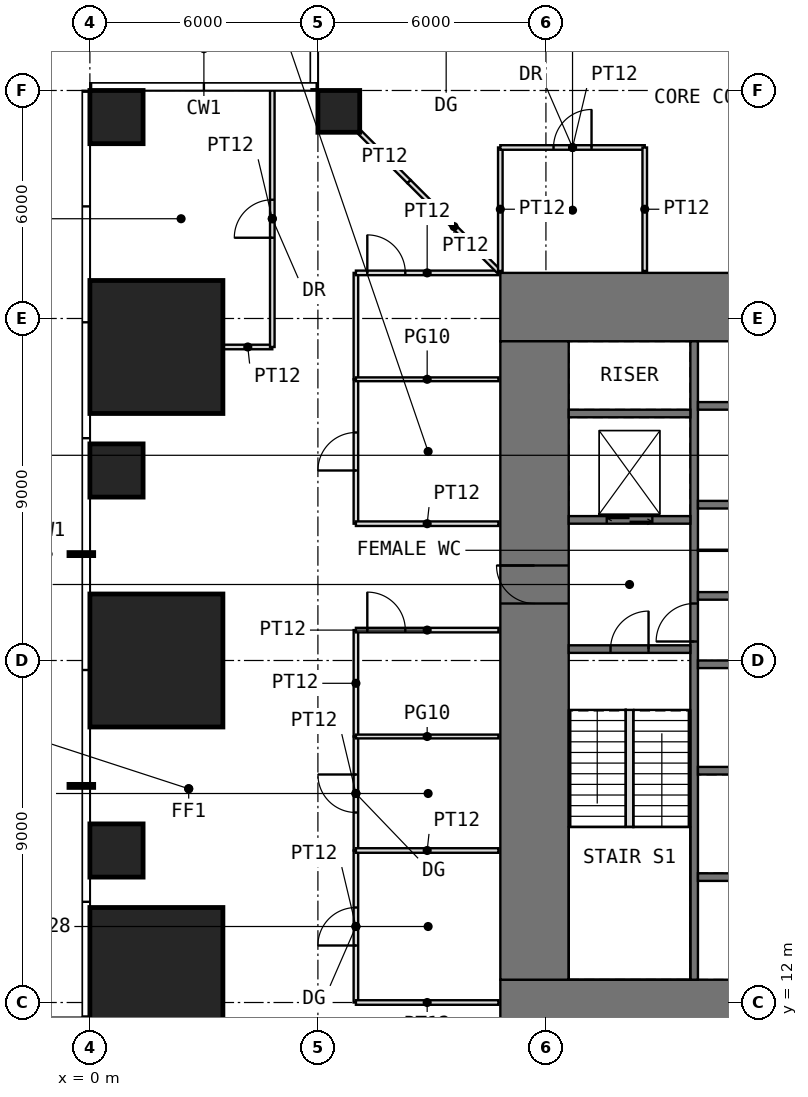
"""IFC4 building model, lengths in metres.
Left out: names, types, materials, properties, quantities, classifications, styles, units other than length and angle.
Written with IfcOpenShell. Run it as: python <this file> out.ifc"""

import sys

from ifc_helpers import new_model, si_unit, direction, frame, frame_2d, origin, origin_2d, place, context, subcontext, project, spatial, rectangle, extrude, element, fill, save


model = new_model("IFC4")
c1 = context("Model", 3, precision=1e-05, world=origin(), true_north=direction((0.0, 1.0)))
c2 = subcontext(c1, "Body", "Model", "MODEL_VIEW")
j1 = project(units=[si_unit("LENGTHUNIT", "METRE"), si_unit("PLANEANGLEUNIT", "RADIAN")], contexts=[c1])
p1 = place(None, origin())
s1 = spatial("IfcSite", under=j1, at=p1, CompositionType="ELEMENT")
p2 = place(p1, origin())
s2 = spatial("IfcBuilding", under=s1, at=p2, CompositionType="ELEMENT")
p3 = place(p2, frame((0.0, 0.0, 70.5)))
s3 = spatial("IfcBuildingStorey", under=s2, at=p3, CompositionType="ELEMENT", Elevation=70.5)
p4 = place(p3, frame((1.75, 12.75, 0.0), z_axis=(0.0, 0.0, 1.0), x_axis=(1.0, 0.0, 0.0)))
e1 = element("IfcColumn", 1, at=p4, inside=s3, PredefinedType="COLUMN", context=c2, shape_type="SweptSolid", body=[
    extrude(rectangle(XDim=3.5, YDim=3.5, at=origin_2d()), origin(), (0.0, 0.0, 1.0), 4.0),
])
p5 = place(p3, frame((0.7, 16.0, 0.0), z_axis=(0.0, 0.0, 1.0), x_axis=(1.0, 0.0, 0.0)))
e2 = element("IfcColumn", 2, at=p5, inside=s3, PredefinedType="COLUMN", context=c2, shape_type="SweptSolid", body=[
    extrude(rectangle(XDim=1.4, YDim=1.4, at=origin_2d()), origin(), (0.0, 0.0, 1.0), 4.0),
])
p6 = place(p3, frame((1.75, 21.0, 0.0), z_axis=(0.0, 0.0, 1.0), x_axis=(1.0, 0.0, 0.0)))
e3 = element("IfcColumn", 3, at=p6, inside=s3, PredefinedType="COLUMN", context=c2, shape_type="SweptSolid", body=[
    extrude(rectangle(XDim=3.5, YDim=3.5, at=origin_2d()), origin(), (0.0, 0.0, 1.0), 4.0),
])
p7 = place(p3, frame((0.7, 26.0, 0.0), z_axis=(0.0, 0.0, 1.0), x_axis=(1.0, 0.0, 0.0)))
e4 = element("IfcColumn", 4, at=p7, inside=s3, PredefinedType="COLUMN", context=c2, shape_type="SweptSolid", body=[
    extrude(rectangle(XDim=1.4, YDim=1.4, at=origin_2d()), origin(), (0.0, 0.0, 1.0), 4.0),
])
p8 = place(p3, frame((1.75, 29.25, 0.0), z_axis=(0.0, 0.0, 1.0), x_axis=(1.0, 0.0, 0.0)))
e5 = element("IfcColumn", 5, at=p8, inside=s3, PredefinedType="COLUMN", context=c2, shape_type="SweptSolid", body=[
    extrude(rectangle(XDim=3.5, YDim=3.5, at=origin_2d()), origin(), (0.0, 0.0, 1.0), 4.0),
])
p9 = place(p3, frame((0.7, 35.3, 0.0), z_axis=(0.0, 0.0, 1.0), x_axis=(1.0, 0.0, 0.0)))
e6 = element("IfcColumn", 6, at=p9, inside=s3, PredefinedType="COLUMN", context=c2, shape_type="SweptSolid", body=[
    extrude(rectangle(XDim=1.4, YDim=1.4, at=origin_2d()), origin(), (0.0, 0.0, 1.0), 4.0),
])
p10 = place(p3, frame((6.55, 35.45, 0.0), z_axis=(0.0, 0.0, 1.0), x_axis=(1.0, 0.0, 0.0)))
e7 = element("IfcColumn", 7, at=p10, inside=s3, PredefinedType="COLUMN", context=c2, shape_type="SweptSolid", body=[
    extrude(rectangle(XDim=1.1, YDim=1.1, at=origin_2d()), origin(), (0.0, 0.0, 1.0), 4.0),
])
p11 = place(p3, frame((10.8, 11.7, -0.05), z_axis=(0.0, 0.0, 1.0), x_axis=(1.0, 0.0, 0.0)))
e8 = element("IfcWall", 8, at=p11, inside=s3, PredefinedType="SHEAR", context=c2, shape_type="SweptSolid", body=[
    extrude(rectangle(XDim=20.4, YDim=1.8, at=frame_2d((10.2, 0.0))), origin(), (0.0, 0.0, 1.0), 4.0),
])
p12 = place(p11, frame((9.2, 0.0, 0.05)))
e9 = element("IfcOpeningElement", 9, at=p12, cuts=e8, PredefinedType="OPENING", context=c2, shape_type="SweptSolid", body=[
    extrude(rectangle(XDim=2.0, YDim=2.2, at=frame_2d((1.0, 1.1))), frame((0.0, 0.91, 0.0), z_axis=(0.0, -1.0, 0.0), x_axis=(1.0, 0.0, 0.0)), (0.0, 0.0, 1.0), 1.82),
])
p13 = place(p3, frame((10.8, 30.3, -0.05), z_axis=(0.0, 0.0, 1.0), x_axis=(1.0, 0.0, 0.0)))
e10 = element("IfcWall", 10, at=p13, inside=s3, PredefinedType="SHEAR", context=c2, shape_type="SweptSolid", body=[
    extrude(rectangle(XDim=20.4, YDim=1.8, at=frame_2d((10.2, 0.0))), origin(), (0.0, 0.0, 1.0), 4.0),
])
p14 = place(p13, frame((9.2, 0.0, 0.05)))
e11 = element("IfcOpeningElement", 11, at=p14, cuts=e10, PredefinedType="OPENING", context=c2, shape_type="SweptSolid", body=[
    extrude(rectangle(XDim=2.0, YDim=2.2, at=frame_2d((1.0, 1.1))), frame((0.0, 0.91, 0.0), z_axis=(0.0, -1.0, 0.0), x_axis=(1.0, 0.0, 0.0)), (0.0, 0.0, 1.0), 1.82),
])
p15 = place(p3, frame((11.7, 12.6, -0.05), z_axis=(0.0, 0.0, 1.0), x_axis=(0.0, 1.0, 0.0)))
e12 = element("IfcWall", 12, at=p15, inside=s3, PredefinedType="SHEAR", context=c2, shape_type="SweptSolid", body=[
    extrude(rectangle(XDim=16.8, YDim=1.8, at=frame_2d((8.4, 0.0))), origin(), (0.0, 0.0, 1.0), 4.0),
])
p16 = place(p15, frame((9.9, 0.0, 0.05)))
e13 = element("IfcOpeningElement", 13, at=p16, cuts=e12, PredefinedType="OPENING", context=c2, shape_type="SweptSolid", body=[
    extrude(rectangle(XDim=1.0, YDim=2.2, at=frame_2d((0.5, 1.1))), frame((0.0, 0.91, 0.0), z_axis=(0.0, -1.0, 0.0), x_axis=(1.0, 0.0, 0.0)), (0.0, 0.0, 1.0), 1.82),
])
p17 = place(p3, frame((15.9, 12.6, -0.05), z_axis=(0.0, 0.0, 1.0), x_axis=(0.0, 1.0, 0.0)))
e14 = element("IfcWall", 14, at=p17, inside=s3, PredefinedType="SHEAR", context=c2, shape_type="SweptSolid", body=[
    extrude(rectangle(XDim=16.8, YDim=0.2, at=frame_2d((8.4, 0.0))), origin(), (0.0, 0.0, 1.0), 4.0),
])
p18 = place(p17, frame((8.9, 0.0, 0.05)))
e15 = element("IfcOpeningElement", 15, at=p18, cuts=e14, PredefinedType="OPENING", context=c2, shape_type="SweptSolid", body=[
    extrude(rectangle(XDim=1.0, YDim=2.2, at=frame_2d((0.5, 1.1))), frame((0.0, 0.11, 0.0), z_axis=(0.0, -1.0, 0.0), x_axis=(1.0, 0.0, 0.0)), (0.0, 0.0, 1.0), 0.22),
])
p19 = place(p3, frame((12.6, 21.3, -0.05), z_axis=(0.0, 0.0, 1.0), x_axis=(1.0, 0.0, 0.0)))
e16 = element("IfcWall", 16, at=p19, inside=s3, PredefinedType="SHEAR", context=c2, shape_type="SweptSolid", body=[
    extrude(rectangle(XDim=3.2, YDim=0.2, at=frame_2d((1.6, 0.0))), origin(), (0.0, 0.0, 1.0), 4.0),
])
p20 = place(p19, frame((1.1, 0.0, 0.05)))
e17 = element("IfcOpeningElement", 17, at=p20, cuts=e16, PredefinedType="OPENING", context=c2, shape_type="SweptSolid", body=[
    extrude(rectangle(XDim=1.0, YDim=2.2, at=frame_2d((0.5, 1.1))), frame((0.0, 0.11, 0.0), z_axis=(0.0, -1.0, 0.0), x_axis=(1.0, 0.0, 0.0)), (0.0, 0.0, 1.0), 0.22),
])
p21 = place(p3, frame((12.6, 24.7, -0.05), z_axis=(0.0, 0.0, 1.0), x_axis=(1.0, 0.0, 0.0)))
e18 = element("IfcWall", 18, at=p21, inside=s3, PredefinedType="SHEAR", context=c2, shape_type="SweptSolid", body=[
    extrude(rectangle(XDim=3.2, YDim=0.2, at=frame_2d((1.6, 0.0))), origin(), (0.0, 0.0, 1.0), 4.0),
])
p22 = place(p21, frame((1.0, 0.0, 0.05)))
e19 = element("IfcOpeningElement", 19, at=p22, cuts=e18, PredefinedType="OPENING", context=c2, shape_type="SweptSolid", body=[
    extrude(rectangle(XDim=1.2, YDim=2.2, at=frame_2d((0.6, 1.1))), frame((0.0, 0.11, 0.0), z_axis=(0.0, -1.0, 0.0), x_axis=(1.0, 0.0, 0.0)), (0.0, 0.0, 1.0), 0.22),
])
for number, where, z_axis, x_axis in (
    (20, (12.6, 27.5, -0.05), (0.0, 0.0, 1.0), (1.0, 0.0, 0.0)),
    (21, (16.0, 15.3, -0.05), (0.0, 0.0, 1.0), (1.0, 0.0, 0.0)),
    (22, (16.0, 18.1, -0.05), (0.0, 0.0, 1.0), (1.0, 0.0, 0.0)),
    (23, (16.0, 20.9, -0.05), (0.0, 0.0, 1.0), (1.0, 0.0, 0.0)),
    (24, (16.0, 22.7, -0.05), (0.0, 0.0, 1.0), (1.0, 0.0, 0.0)),
    (25, (16.0, 25.1, -0.05), (0.0, 0.0, 1.0), (1.0, 0.0, 0.0)),
    (26, (16.0, 27.7, -0.05), (0.0, 0.0, 1.0), (1.0, 0.0, 0.0)),
):
    element("IfcWall", number, at=place(p3, frame(where, z_axis=z_axis, x_axis=x_axis)), inside=s3, PredefinedType="SHEAR", context=c2, shape_type="SweptSolid", body=[
        extrude(rectangle(XDim=3.2, YDim=0.2, at=frame_2d((1.6, 0.0))), origin(), (0.0, 0.0, 1.0), 4.0),
    ])
p23 = place(p3, frame((16.0, 23.9, 0.0), z_axis=(0.0, 0.0, 1.0), x_axis=(1.0, 0.0, 0.0)))
e27 = element("IfcWall", 27, at=p23, inside=s3, PredefinedType="PARTITIONING", context=c2, shape_type="SweptSolid", body=[
    extrude(rectangle(XDim=1.4, YDim=0.03, at=frame_2d((0.7, 0.0))), origin(), (0.0, 0.0, 1.0), 3.75),
])
p24 = place(p3, frame((3.51, 29.25, 0.0), z_axis=(0.0, 0.0, 1.0), x_axis=(1.0, 0.0, 0.0)))
e28 = element("IfcWall", 28, at=p24, inside=s3, PredefinedType="PARTITIONING", context=c2, shape_type="SweptSolid", body=[
    extrude(rectangle(XDim=1.29, YDim=0.12, at=frame_2d((0.645, 0.0))), origin(), (0.0, 0.0, 1.0), 3.75),
])
p25 = place(p3, frame((4.8, 29.25, 0.0), z_axis=(0.0, 0.0, 1.0), x_axis=(0.0, 1.0, 0.0)))
e29 = element("IfcWall", 29, at=p25, inside=s3, PredefinedType="PARTITIONING", context=c2, shape_type="SweptSolid", body=[
    extrude(rectangle(XDim=6.75, YDim=0.12, at=frame_2d((3.375, 0.0))), origin(), (0.0, 0.0, 1.0), 3.75),
])
p26 = place(p25, frame((2.875, 0.0, 0.0)))
e30 = element("IfcOpeningElement", 30, at=p26, cuts=e29, PredefinedType="OPENING", context=c2, shape_type="SweptSolid", body=[
    extrude(rectangle(XDim=1.0, YDim=2.2, at=frame_2d((0.5, 1.1))), frame((0.0, 0.07, 0.0), z_axis=(0.0, -1.0, 0.0), x_axis=(1.0, 0.0, 0.0)), (0.0, 0.0, 1.0), 0.14),
])
p27 = place(p3, frame((7.0, 12.0, 0.0), z_axis=(0.0, 0.0, 1.0), x_axis=(0.0, 1.0, 0.0)))
e31 = element("IfcWall", 31, at=p27, inside=s3, PredefinedType="PARTITIONING", context=c2, shape_type="SweptSolid", body=[
    extrude(rectangle(XDim=4.0, YDim=0.12, at=frame_2d((2.0, 0.0))), origin(), (0.0, 0.0, 1.0), 3.75),
])
p28 = place(p27, frame((1.5, 0.0, 0.0)))
e32 = element("IfcOpeningElement", 32, at=p28, cuts=e31, PredefinedType="OPENING", context=c2, shape_type="SweptSolid", body=[
    extrude(rectangle(XDim=1.0, YDim=2.4, at=frame_2d((0.5, 1.2))), frame((0.0, 0.07, 0.0), z_axis=(0.0, -1.0, 0.0), x_axis=(1.0, 0.0, 0.0)), (0.0, 0.0, 1.0), 0.14),
])
p29 = place(p3, frame((7.0, 12.0, 0.0), z_axis=(0.0, 0.0, 1.0), x_axis=(1.0, 0.0, 0.0)))
e33 = element("IfcWall", 33, at=p29, inside=s3, PredefinedType="PARTITIONING", context=c2, shape_type="SweptSolid", body=[
    extrude(rectangle(XDim=3.75, YDim=0.12, at=frame_2d((1.875, 0.0))), origin(), (0.0, 0.0, 1.0), 3.75),
])
p30 = place(p3, frame((7.0, 16.0, 0.0), z_axis=(0.0, 0.0, 1.0), x_axis=(0.0, 1.0, 0.0)))
e34 = element("IfcWall", 34, at=p30, inside=s3, PredefinedType="PARTITIONING", context=c2, shape_type="SweptSolid", body=[
    extrude(rectangle(XDim=3.0, YDim=0.12, at=frame_2d((1.5, 0.0))), origin(), (0.0, 0.0, 1.0), 3.75),
])
p31 = place(p30, frame((1.0, 0.0, 0.0)))
e35 = element("IfcOpeningElement", 35, at=p31, cuts=e34, PredefinedType="OPENING", context=c2, shape_type="SweptSolid", body=[
    extrude(rectangle(XDim=1.0, YDim=2.4, at=frame_2d((0.5, 1.2))), frame((0.0, 0.07, 0.0), z_axis=(0.0, -1.0, 0.0), x_axis=(1.0, 0.0, 0.0)), (0.0, 0.0, 1.0), 0.14),
])
p32 = place(p3, frame((7.0, 16.0, 0.0), z_axis=(0.0, 0.0, 1.0), x_axis=(1.0, 0.0, 0.0)))
e36 = element("IfcWall", 36, at=p32, inside=s3, PredefinedType="PARTITIONING", context=c2, shape_type="SweptSolid", body=[
    extrude(rectangle(XDim=3.75, YDim=0.12, at=frame_2d((1.875, 0.0))), origin(), (0.0, 0.0, 1.0), 3.75),
])
p33 = place(p3, frame((7.0, 19.0, 0.0), z_axis=(0.0, 0.0, 1.0), x_axis=(0.0, 1.0, 0.0)))
e37 = element("IfcWall", 37, at=p33, inside=s3, PredefinedType="PARTITIONING", context=c2, shape_type="SweptSolid", body=[
    extrude(rectangle(XDim=2.8, YDim=0.12, at=frame_2d((1.4, 0.0))), origin(), (0.0, 0.0, 1.0), 3.75),
])
p34 = place(p3, frame((7.0, 19.0, 0.0), z_axis=(0.0, 0.0, 1.0), x_axis=(1.0, 0.0, 0.0)))
e38 = element("IfcWall", 38, at=p34, inside=s3, PredefinedType="PARTITIONING", context=c2, shape_type="SweptSolid", body=[
    extrude(rectangle(XDim=3.75, YDim=0.1, at=frame_2d((1.875, 0.0))), origin(), (0.0, 0.0, 1.0), 3.75),
])
p35 = place(p3, frame((7.0, 21.8, 0.0), z_axis=(0.0, 0.0, 1.0), x_axis=(1.0, 0.0, 0.0)))
e39 = element("IfcWall", 39, at=p35, inside=s3, PredefinedType="PARTITIONING", context=c2, shape_type="SweptSolid", body=[
    extrude(rectangle(XDim=3.75, YDim=0.12, at=frame_2d((1.875, 0.0))), origin(), (0.0, 0.0, 1.0), 3.75),
])
p36 = place(p35, frame((0.3, 0.0, 0.0)))
e40 = element("IfcOpeningElement", 40, at=p36, cuts=e39, PredefinedType="OPENING", context=c2, shape_type="SweptSolid", body=[
    extrude(rectangle(XDim=1.0, YDim=2.4, at=frame_2d((0.5, 1.2))), frame((0.0, 0.07, 0.0), z_axis=(0.0, -1.0, 0.0), x_axis=(1.0, 0.0, 0.0)), (0.0, 0.0, 1.0), 0.14),
])
p37 = place(p3, frame((7.0, 24.6, 0.0), z_axis=(0.0, 0.0, 1.0), x_axis=(0.0, 1.0, 0.0)))
e41 = element("IfcWall", 41, at=p37, inside=s3, PredefinedType="PARTITIONING", context=c2, shape_type="SweptSolid", body=[
    extrude(rectangle(XDim=3.8, YDim=0.12, at=frame_2d((1.9, 0.0))), origin(), (0.0, 0.0, 1.0), 3.75),
])
p38 = place(p37, frame((1.4, 0.0, 0.0)))
e42 = element("IfcOpeningElement", 42, at=p38, cuts=e41, PredefinedType="OPENING", context=c2, shape_type="SweptSolid", body=[
    extrude(rectangle(XDim=1.0, YDim=2.4, at=frame_2d((0.5, 1.2))), frame((0.0, 0.07, 0.0), z_axis=(0.0, -1.0, 0.0), x_axis=(1.0, 0.0, 0.0)), (0.0, 0.0, 1.0), 0.14),
])
p39 = place(p3, frame((7.0, 24.6, 0.0), z_axis=(0.0, 0.0, 1.0), x_axis=(1.0, 0.0, 0.0)))
e43 = element("IfcWall", 43, at=p39, inside=s3, PredefinedType="PARTITIONING", context=c2, shape_type="SweptSolid", body=[
    extrude(rectangle(XDim=3.75, YDim=0.12, at=frame_2d((1.875, 0.0))), origin(), (0.0, 0.0, 1.0), 3.75),
])
p40 = place(p3, frame((7.0, 28.4, 0.0), z_axis=(0.0, 0.0, 1.0), x_axis=(0.0, 1.0, 0.0)))
e44 = element("IfcWall", 44, at=p40, inside=s3, PredefinedType="PARTITIONING", context=c2, shape_type="SweptSolid", body=[
    extrude(rectangle(XDim=2.8, YDim=0.12, at=frame_2d((1.4, 0.0))), origin(), (0.0, 0.0, 1.0), 3.75),
])
p41 = place(p3, frame((7.0, 28.4, 0.0), z_axis=(0.0, 0.0, 1.0), x_axis=(1.0, 0.0, 0.0)))
e45 = element("IfcWall", 45, at=p41, inside=s3, PredefinedType="PARTITIONING", context=c2, shape_type="SweptSolid", body=[
    extrude(rectangle(XDim=3.75, YDim=0.1, at=frame_2d((1.875, 0.0))), origin(), (0.0, 0.0, 1.0), 3.75),
])
p42 = place(p3, frame((7.0, 31.2, 0.0), z_axis=(0.0, 0.0, 1.0), x_axis=(1.0, 0.0, 0.0)))
e46 = element("IfcWall", 46, at=p42, inside=s3, PredefinedType="PARTITIONING", context=c2, shape_type="SweptSolid", body=[
    extrude(rectangle(XDim=3.75, YDim=0.12, at=frame_2d((1.875, 0.0))), origin(), (0.0, 0.0, 1.0), 3.75),
])
p43 = place(p42, frame((0.3, 0.0, 0.0)))
e47 = element("IfcOpeningElement", 47, at=p43, cuts=e46, PredefinedType="OPENING", context=c2, shape_type="SweptSolid", body=[
    extrude(rectangle(XDim=1.0, YDim=2.4, at=frame_2d((0.5, 1.2))), frame((0.0, 0.07, 0.0), z_axis=(0.0, -1.0, 0.0), x_axis=(1.0, 0.0, 0.0)), (0.0, 0.0, 1.0), 0.14),
])
p44 = place(p3, frame((7.11, 34.89, 0.0), z_axis=(0.0, 0.0, 1.0), x_axis=(0.707106781187, -0.707106781187, 0.0)))
e48 = element("IfcWall", 48, at=p44, inside=s3, PredefinedType="PARTITIONING", context=c2, shape_type="SweptSolid", body=[
    extrude(rectangle(XDim=1.822, YDim=0.12, at=frame_2d((0.911, 0.0))), origin(), (0.0, 0.0, 1.0), 3.75),
])
p45 = place(p3, frame((8.398, 33.602, 0.0), z_axis=(0.0, 0.0, 1.0), x_axis=(0.707106781187, -0.707106781187, 0.0)))
e49 = element("IfcWall", 49, at=p45, inside=s3, PredefinedType="PARTITIONING", context=c2, shape_type="SweptSolid", body=[
    extrude(rectangle(XDim=3.346, YDim=0.12, at=frame_2d((1.673, 0.0))), origin(), (0.0, 0.0, 1.0), 3.75),
])
p46 = place(p3, frame((10.8, 31.25, 0.0), z_axis=(0.0, 0.0, 1.0), x_axis=(0.0, 1.0, 0.0)))
e50 = element("IfcWall", 50, at=p46, inside=s3, PredefinedType="PARTITIONING", context=c2, shape_type="SweptSolid", body=[
    extrude(rectangle(XDim=3.25, YDim=0.12, at=frame_2d((1.625, 0.0))), origin(), (0.0, 0.0, 1.0), 3.75),
])
p47 = place(p3, frame((10.8, 34.5, 0.0), z_axis=(0.0, 0.0, 1.0), x_axis=(1.0, 0.0, 0.0)))
e51 = element("IfcWall", 51, at=p47, inside=s3, PredefinedType="PARTITIONING", context=c2, shape_type="SweptSolid", body=[
    extrude(rectangle(XDim=3.8, YDim=0.12, at=frame_2d((1.9, 0.0))), origin(), (0.0, 0.0, 1.0), 3.75),
])
p48 = place(p47, frame((1.4, 0.0, 0.0)))
e52 = element("IfcOpeningElement", 52, at=p48, cuts=e51, PredefinedType="OPENING", context=c2, shape_type="SweptSolid", body=[
    extrude(rectangle(XDim=1.0, YDim=2.2, at=frame_2d((0.5, 1.1))), frame((0.0, 0.07, 0.0), z_axis=(0.0, -1.0, 0.0), x_axis=(1.0, 0.0, 0.0)), (0.0, 0.0, 1.0), 0.14),
])
p49 = place(p3, frame((14.6, 31.25, 0.0), z_axis=(0.0, 0.0, 1.0), x_axis=(0.0, 1.0, 0.0)))
e53 = element("IfcWall", 53, at=p49, inside=s3, PredefinedType="PARTITIONING", context=c2, shape_type="SweptSolid", body=[
    extrude(rectangle(XDim=3.25, YDim=0.12, at=frame_2d((1.625, 0.0))), origin(), (0.0, 0.0, 1.0), 3.75),
])
p50 = place(p3, frame((14.2, 16.62, 0.0), z_axis=(0.0, 0.0, 1.0), x_axis=(0.0, 1.0, 0.0)))
e54 = element("IfcWall", 54, at=p50, inside=s3, PredefinedType="PARTITIONING", context=c2, shape_type="SweptSolid", body=[
    extrude(rectangle(XDim=3.08, YDim=0.2, at=frame_2d((1.54, 0.0))), origin(), (0.0, 0.0, 1.0), 4.0),
])
p51 = place(p16, origin())
e55 = element("IfcDoor", 55, at=p51, inside=s3, OperationType="SINGLE_SWING_RIGHT", PredefinedType="DOOR", context=c2, shape_type="SweptSolid", body=[
    extrude(rectangle(XDim=1.0, YDim=2.2, at=frame_2d((0.5, 1.1))), frame((0.0, 0.025, 0.0), z_axis=(0.0, -1.0, 0.0), x_axis=(1.0, 0.0, 0.0)), (0.0, 0.0, 1.0), 0.05),
])
fill(e13, e55)
p52 = place(p20, origin())
e56 = element("IfcDoor", 56, at=p52, inside=s3, OperationType="SINGLE_SWING_RIGHT", PredefinedType="DOOR", context=c2, shape_type="SweptSolid", body=[
    extrude(rectangle(XDim=1.0, YDim=2.2, at=frame_2d((0.5, 1.1))), frame((0.0, 0.025, 0.0), z_axis=(0.0, -1.0, 0.0), x_axis=(1.0, 0.0, 0.0)), (0.0, 0.0, 1.0), 0.05),
])
fill(e17, e56)
p53 = place(p18, origin())
e57 = element("IfcDoor", 57, at=p53, inside=s3, OperationType="SINGLE_SWING_LEFT", PredefinedType="DOOR", context=c2, shape_type="SweptSolid", body=[
    extrude(rectangle(XDim=1.0, YDim=2.2, at=frame_2d((0.5, 1.1))), frame((0.0, 0.025, 0.0), z_axis=(0.0, -1.0, 0.0), x_axis=(1.0, 0.0, 0.0)), (0.0, 0.0, 1.0), 0.05),
])
fill(e15, e57)
p54 = place(p48, origin())
e58 = element("IfcDoor", 58, at=p54, inside=s3, OperationType="SINGLE_SWING_RIGHT", PredefinedType="DOOR", context=c2, shape_type="SweptSolid", body=[
    extrude(rectangle(XDim=1.0, YDim=2.2, at=frame_2d((0.5, 1.1))), frame((0.0, 0.025, 0.0), z_axis=(0.0, -1.0, 0.0), x_axis=(1.0, 0.0, 0.0)), (0.0, 0.0, 1.0), 0.05),
])
fill(e52, e58)
p55 = place(p28, origin())
e59 = element("IfcDoor", 59, at=p55, inside=s3, OperationType="SINGLE_SWING_LEFT", PredefinedType="DOOR", context=c2, shape_type="SweptSolid", body=[
    extrude(rectangle(XDim=1.0, YDim=2.4, at=frame_2d((0.5, 1.2))), frame((0.0, 0.025, 0.0), z_axis=(0.0, -1.0, 0.0), x_axis=(1.0, 0.0, 0.0)), (0.0, 0.0, 1.0), 0.05),
])
fill(e32, e59)
p56 = place(p31, origin())
e60 = element("IfcDoor", 60, at=p56, inside=s3, OperationType="SINGLE_SWING_RIGHT", PredefinedType="DOOR", context=c2, shape_type="SweptSolid", body=[
    extrude(rectangle(XDim=1.0, YDim=2.4, at=frame_2d((0.5, 1.2))), frame((0.0, 0.025, 0.0), z_axis=(0.0, -1.0, 0.0), x_axis=(1.0, 0.0, 0.0)), (0.0, 0.0, 1.0), 0.05),
])
fill(e35, e60)
p57 = place(p38, origin())
e61 = element("IfcDoor", 61, at=p57, inside=s3, OperationType="SINGLE_SWING_LEFT", PredefinedType="DOOR", context=c2, shape_type="SweptSolid", body=[
    extrude(rectangle(XDim=1.0, YDim=2.4, at=frame_2d((0.5, 1.2))), frame((0.0, 0.025, 0.0), z_axis=(0.0, -1.0, 0.0), x_axis=(1.0, 0.0, 0.0)), (0.0, 0.0, 1.0), 0.05),
])
fill(e42, e61)
p58 = place(p26, origin())
e62 = element("IfcDoor", 62, at=p58, inside=s3, OperationType="SINGLE_SWING_LEFT", PredefinedType="DOOR", context=c2, shape_type="SweptSolid", body=[
    extrude(rectangle(XDim=1.0, YDim=2.2, at=frame_2d((0.5, 1.1))), frame((0.0, 0.025, 0.0), z_axis=(0.0, -1.0, 0.0), x_axis=(1.0, 0.0, 0.0)), (0.0, 0.0, 1.0), 0.05),
])
fill(e30, e62)
p59 = place(p43, origin())
e63 = element("IfcDoor", 63, at=p59, inside=s3, OperationType="SINGLE_SWING_LEFT", PredefinedType="DOOR", context=c2, shape_type="SweptSolid", body=[
    extrude(rectangle(XDim=1.0, YDim=2.4, at=frame_2d((0.5, 1.2))), frame((0.0, 0.025, 0.0), z_axis=(0.0, -1.0, 0.0), x_axis=(1.0, 0.0, 0.0)), (0.0, 0.0, 1.0), 0.05),
])
fill(e47, e63)
p60 = place(p36, origin())
e64 = element("IfcDoor", 64, at=p60, inside=s3, OperationType="SINGLE_SWING_LEFT", PredefinedType="DOOR", context=c2, shape_type="SweptSolid", body=[
    extrude(rectangle(XDim=1.0, YDim=2.4, at=frame_2d((0.5, 1.2))), frame((0.0, 0.025, 0.0), z_axis=(0.0, -1.0, 0.0), x_axis=(1.0, 0.0, 0.0)), (0.0, 0.0, 1.0), 0.05),
])
fill(e40, e64)
p61 = place(p22, origin())
e65 = element("IfcDoor", 65, at=p61, inside=s3, OperationType="DOUBLE_DOOR_SLIDING", PredefinedType="DOOR", context=c2, shape_type="SweptSolid", body=[
    extrude(rectangle(XDim=1.2, YDim=2.2, at=frame_2d((0.6, 1.1))), frame((0.0, 0.025, 0.0), z_axis=(0.0, -1.0, 0.0), x_axis=(1.0, 0.0, 0.0)), (0.0, 0.0, 1.0), 0.05),
])
fill(e19, e65)
save(model, sys.argv[1])
